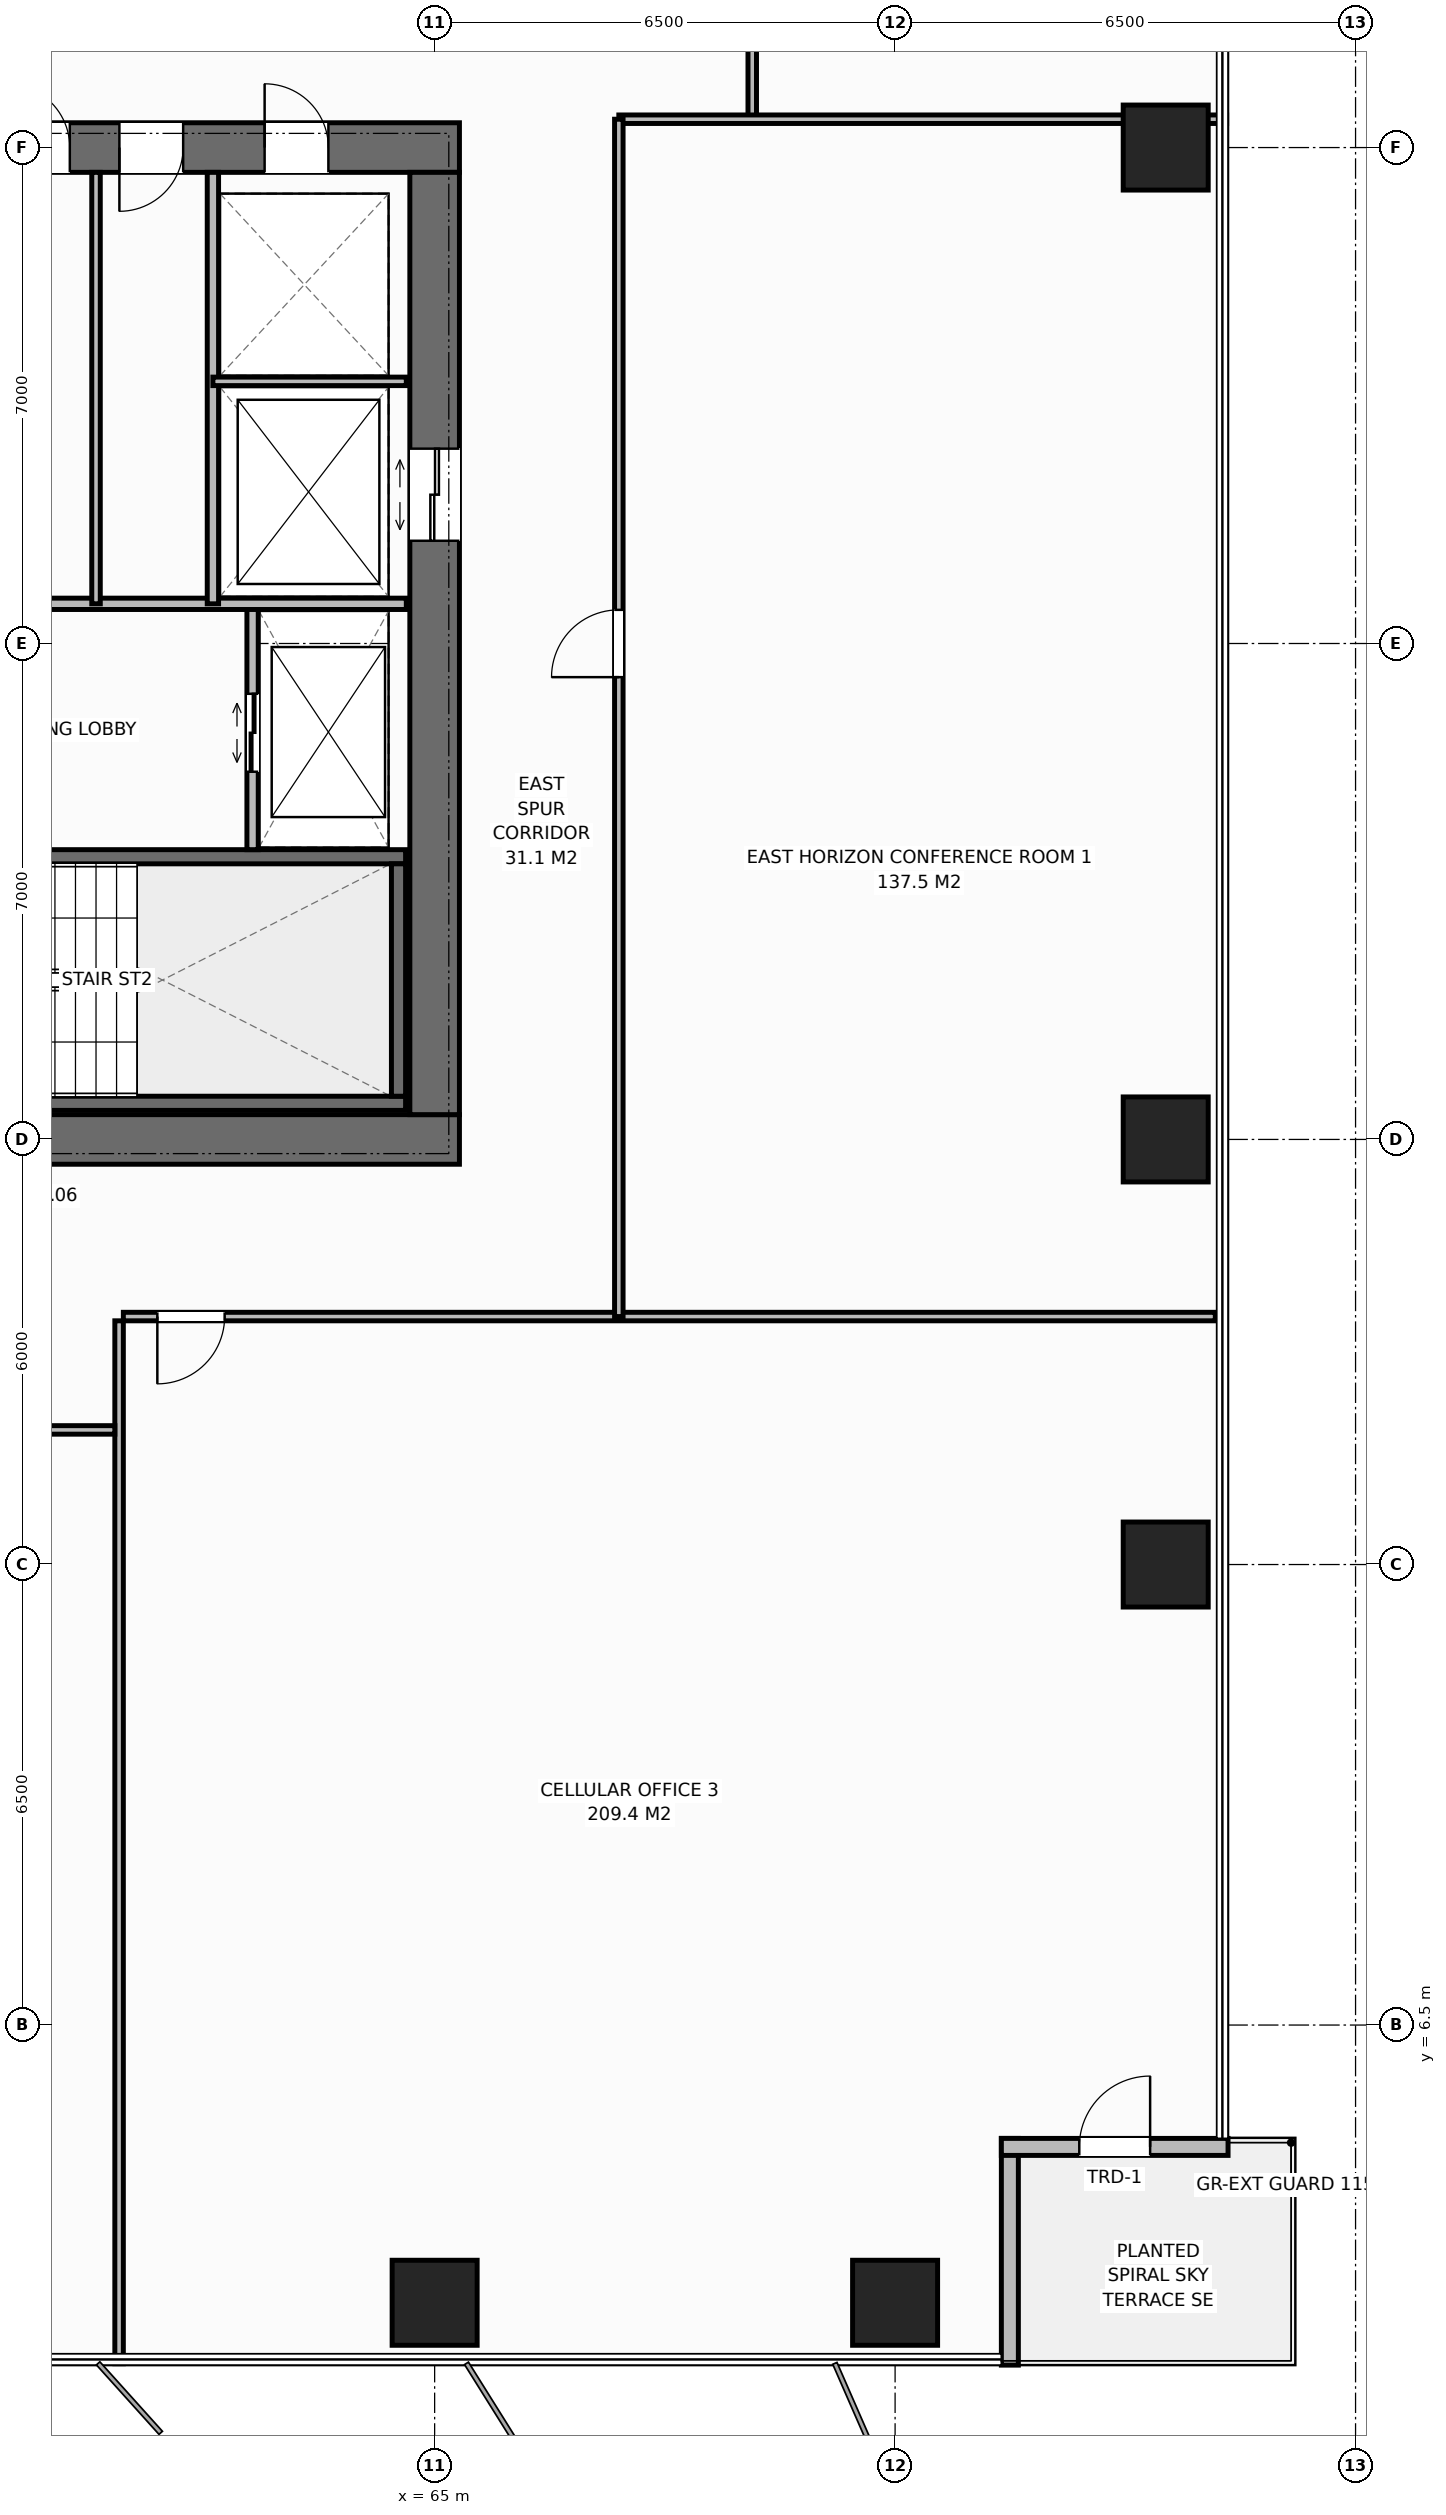
"""IFC4 building model, lengths in metres.
Left out: names, types, materials, properties, quantities, classifications, styles, units other than length and angle.
Written with IfcOpenShell. Run it as: python <this file> out.ifc"""

import sys

from ifc_helpers import new_model, si_unit, direction, frame, frame_2d, origin, origin_2d, place, context, subcontext, project, spatial, rectangle, extrude, element, fill, save


model = new_model("IFC4")
c1 = context("Model", 3, precision=1e-05, world=origin(), true_north=direction((0.0, 1.0)))
c2 = subcontext(c1, "Body", "Model", "MODEL_VIEW")
j1 = project(units=[si_unit("LENGTHUNIT", "METRE"), si_unit("PLANEANGLEUNIT", "RADIAN")], contexts=[c1])
p1 = place(None, origin())
s1 = spatial("IfcSite", under=j1, at=p1, CompositionType="ELEMENT")
p2 = place(p1, origin())
s2 = spatial("IfcBuilding", under=s1, at=p2, CompositionType="ELEMENT")
p3 = place(p2, frame((0.0, 0.0, 112.6)))
s3 = spatial("IfcBuildingStorey", under=s2, at=p3, CompositionType="ELEMENT", Elevation=112.6)
p4 = place(p3, frame((51.65, 19.0, 0.0), z_axis=(0.0, 0.0, 1.0), x_axis=(1.0, 0.0, 0.0)))
e1 = element("IfcWall", 1, at=p4, inside=s3, PredefinedType="SHEAR", context=c2, shape_type="SweptSolid", body=[
    extrude(rectangle(XDim=13.7, YDim=0.7, at=frame_2d((6.85, 0.0))), origin(), (0.0, 0.0, 1.0), 3.8),
])
p5 = place(p4, frame((3.07, 0.0, 0.0)))
e2 = element("IfcOpeningElement", 2, at=p5, cuts=e1, PredefinedType="OPENING", context=c2, shape_type="SweptSolid", body=[
    extrude(rectangle(XDim=1.4, YDim=2.2, at=frame_2d((0.7, 1.1))), frame((0.0, 0.36, 0.0), z_axis=(0.0, -1.0, 0.0), x_axis=(1.0, 0.0, 0.0)), (0.0, 0.0, 1.0), 0.72),
])
p6 = place(p3, frame((51.65, 33.0, 0.0), z_axis=(0.0, 0.0, 1.0), x_axis=(1.0, 0.0, 0.0)))
e3 = element("IfcWall", 3, at=p6, inside=s3, PredefinedType="SHEAR", context=c2, shape_type="SweptSolid", body=[
    extrude(rectangle(XDim=13.7, YDim=0.7, at=frame_2d((6.85, 0.0))), origin(), (0.0, 0.0, 1.0), 3.8),
])
p7 = place(p6, frame((3.07, 0.0, 0.0)))
e4 = element("IfcOpeningElement", 4, at=p7, cuts=e3, PredefinedType="OPENING", context=c2, shape_type="SweptSolid", body=[
    extrude(rectangle(XDim=1.4, YDim=2.2, at=frame_2d((0.7, 1.1))), frame((0.0, 0.36, 0.0), z_axis=(0.0, -1.0, 0.0), x_axis=(1.0, 0.0, 0.0)), (0.0, 0.0, 1.0), 0.72),
])
p8 = place(p6, frame((10.95, 0.0, 0.0)))
e5 = element("IfcOpeningElement", 5, at=p8, cuts=e3, PredefinedType="OPENING", context=c2, shape_type="SweptSolid", body=[
    extrude(rectangle(XDim=0.9, YDim=2.15, at=frame_2d((0.45, 1.075))), frame((0.0, 0.36, 0.0), z_axis=(0.0, -1.0, 0.0), x_axis=(1.0, 0.0, 0.0)), (0.0, 0.0, 1.0), 0.72),
])
p9 = place(p6, frame((5.7, 0.0, 0.0)))
e6 = element("IfcOpeningElement", 6, at=p9, cuts=e3, PredefinedType="OPENING", context=c2, shape_type="SweptSolid", body=[
    extrude(rectangle(XDim=0.9, YDim=2.15, at=frame_2d((0.45, 1.075))), frame((0.0, 0.36, 0.0), z_axis=(0.0, -1.0, 0.0), x_axis=(1.0, 0.0, 0.0)), (0.0, 0.0, 1.0), 0.72),
])
p10 = place(p6, frame((7.3, 0.0, 0.0)))
e7 = element("IfcOpeningElement", 7, at=p10, cuts=e3, PredefinedType="OPENING", context=c2, shape_type="SweptSolid", body=[
    extrude(rectangle(XDim=0.9, YDim=2.15, at=frame_2d((0.45, 1.075))), frame((0.0, 0.36, 0.0), z_axis=(0.0, -1.0, 0.0), x_axis=(1.0, 0.0, 0.0)), (0.0, 0.0, 1.0), 0.72),
])
p11 = place(p6, frame((8.9, 0.0, 0.0)))
e8 = element("IfcOpeningElement", 8, at=p11, cuts=e3, PredefinedType="OPENING", context=c2, shape_type="SweptSolid", body=[
    extrude(rectangle(XDim=0.9, YDim=2.15, at=frame_2d((0.45, 1.075))), frame((0.0, 0.36, 0.0), z_axis=(0.0, -1.0, 0.0), x_axis=(1.0, 0.0, 0.0)), (0.0, 0.0, 1.0), 0.72),
])
p12 = place(p3, frame((65.0, 19.35, 0.0), z_axis=(0.0, 0.0, 1.0), x_axis=(0.0, 1.0, 0.0)))
e9 = element("IfcWall", 9, at=p12, inside=s3, PredefinedType="SHEAR", context=c2, shape_type="SweptSolid", body=[
    extrude(rectangle(XDim=13.3, YDim=0.7, at=frame_2d((6.65, 0.0))), origin(), (0.0, 0.0, 1.0), 3.8),
])
p13 = place(p12, frame((8.1, 0.0, 0.0)))
e10 = element("IfcOpeningElement", 10, at=p13, cuts=e9, PredefinedType="OPENING", context=c2, shape_type="SweptSolid", body=[
    extrude(rectangle(XDim=1.3, YDim=2.2, at=frame_2d((0.65, 1.1))), frame((0.0, 0.36, 0.0), z_axis=(0.0, -1.0, 0.0), x_axis=(1.0, 0.0, 0.0)), (0.0, 0.0, 1.0), 0.72),
])
p14 = place(p3, frame((56.16, 19.51, 0.0), z_axis=(0.0, 0.0, 1.0), x_axis=(1.0, 0.0, 0.0)))
e11 = element("IfcWall", 11, at=p14, inside=s3, PredefinedType="SHEAR", context=c2, shape_type="SweptSolid", body=[
    extrude(rectangle(XDim=8.43, YDim=0.2, at=frame_2d((4.215, 0.0))), origin(), (0.0, 0.0, 1.0), 3.8),
])
p15 = place(p3, frame((56.16, 22.99, 0.0), z_axis=(0.0, 0.0, 1.0), x_axis=(1.0, 0.0, 0.0)))
e12 = element("IfcWall", 12, at=p15, inside=s3, PredefinedType="SHEAR", context=c2, shape_type="SweptSolid", body=[
    extrude(rectangle(XDim=8.43, YDim=0.2, at=frame_2d((4.215, 0.0))), origin(), (0.0, 0.0, 1.0), 3.8),
])
p16 = place(p15, frame((0.45, 0.0, 0.0)))
e13 = element("IfcOpeningElement", 13, at=p16, cuts=e12, PredefinedType="OPENING", context=c2, shape_type="SweptSolid", body=[
    extrude(rectangle(XDim=1.0, YDim=2.15, at=frame_2d((0.5, 1.075))), frame((0.0, 0.11, 0.0), z_axis=(0.0, -1.0, 0.0), x_axis=(1.0, 0.0, 0.0)), (0.0, 0.0, 1.0), 0.22),
])
p17 = place(p3, frame((64.49, 19.61, 0.0), z_axis=(0.0, 0.0, 1.0), x_axis=(0.0, 1.0, 0.0)))
e14 = element("IfcWall", 14, at=p17, inside=s3, PredefinedType="SHEAR", context=c2, shape_type="SweptSolid", body=[
    extrude(rectangle(XDim=3.28, YDim=0.2, at=frame_2d((1.64, 0.0))), origin(), (0.0, 0.0, 1.0), 3.8),
])
for number, where, z_axis, x_axis in (
    (15, (65.0, 2.58, 0.0), (0.0, 0.0, 1.0), (1.0, 0.0, 0.0)),
    (16, (71.5, 2.58, 0.0), (0.0, 0.0, 1.0), (1.0, 0.0, 0.0)),
    (17, (75.32, 13.0, 0.0), (0.0, 0.0, 1.0), (1.0, 0.0, 0.0)),
    (18, (75.32, 19.0, 0.0), (0.0, 0.0, 1.0), (1.0, 0.0, 0.0)),
    (19, (75.32, 33.0, 0.0), (0.0, 0.0, 1.0), (1.0, 0.0, 0.0)),
):
    element("IfcColumn", number, at=place(p3, frame(where, z_axis=z_axis, x_axis=x_axis)), inside=s3, PredefinedType="COLUMN", context=c2, shape_type="SweptSolid", body=[
        extrude(rectangle(XDim=1.2, YDim=1.2, at=origin_2d()), origin(), (0.0, 0.0, 1.0), 3.8),
    ])
p18 = place(p3, frame((73.12, 4.9, 0.0), z_axis=(0.0, 0.0, 1.0), x_axis=(0.0, -1.0, 0.0)))
e20 = element("IfcWall", 20, at=p18, inside=s3, PredefinedType="STANDARD", context=c2, shape_type="SweptSolid", body=[
    extrude(rectangle(XDim=3.2, YDim=0.24, at=frame_2d((1.6, 0.0))), origin(), (0.0, 0.0, 1.0), 3.565),
])
p19 = place(p3, frame((76.2, 4.78, 0.0), z_axis=(0.0, 0.0, 1.0), x_axis=(-1.0, 0.0, 0.0)))
e21 = element("IfcWall", 21, at=p19, inside=s3, PredefinedType="STANDARD", context=c2, shape_type="SweptSolid", body=[
    extrude(rectangle(XDim=3.2, YDim=0.24, at=frame_2d((1.6, 0.0))), origin(), (0.0, 0.0, 1.0), 3.565),
])
p20 = place(p19, frame((1.1, 0.0, 0.0)))
e22 = element("IfcOpeningElement", 22, at=p20, cuts=e21, PredefinedType="OPENING", context=c2, shape_type="SweptSolid", body=[
    extrude(rectangle(XDim=1.0, YDim=2.2, at=frame_2d((0.5, 1.1))), frame((0.0, 0.13, 0.0), z_axis=(0.0, -1.0, 0.0), x_axis=(1.0, 0.0, 0.0)), (0.0, 0.0, 1.0), 0.26),
])
p21 = place(p3, frame((62.43, 23.09, 0.0), z_axis=(0.0, 0.0, 1.0), x_axis=(0.0, 1.0, 0.0)))
e23 = element("IfcWall", 23, at=p21, inside=s3, PredefinedType="STANDARD", context=c2, shape_type="SweptSolid", body=[
    extrude(rectangle(XDim=3.47, YDim=0.16, at=frame_2d((1.735, 0.0))), origin(), (0.0, 0.0, 1.0), 3.565),
])
p22 = place(p21, frame((1.1, 0.0, 0.0)))
e24 = element("IfcOpeningElement", 24, at=p22, cuts=e23, PredefinedType="OPENING", context=c2, shape_type="SweptSolid", body=[
    extrude(rectangle(XDim=1.1, YDim=2.2, at=frame_2d((0.55, 1.1))), frame((0.0, 0.09, 0.0), z_axis=(0.0, -1.0, 0.0), x_axis=(1.0, 0.0, 0.0)), (0.0, 0.0, 1.0), 0.18),
])
p23 = place(p3, frame((56.26, 26.56, 0.0), z_axis=(0.0, 0.0, 1.0), x_axis=(1.0, 0.0, 0.0)))
e25 = element("IfcWall", 25, at=p23, inside=s3, PredefinedType="STANDARD", context=c2, shape_type="SweptSolid", body=[
    extrude(rectangle(XDim=8.34, YDim=0.16, at=frame_2d((4.17, 0.0))), origin(), (0.0, 0.0, 1.0), 3.565),
])
p24 = place(p3, frame((61.87, 26.56, 0.0), z_axis=(0.0, 0.0, 1.0), x_axis=(0.0, 1.0, 0.0)))
e26 = element("IfcWall", 26, at=p24, inside=s3, PredefinedType="STANDARD", context=c2, shape_type="SweptSolid", body=[
    extrude(rectangle(XDim=6.09, YDim=0.16, at=frame_2d((3.045, 0.0))), origin(), (0.0, 0.0, 1.0), 3.565),
])
p25 = place(p3, frame((61.87, 29.7, 0.0), z_axis=(0.0, 0.0, 1.0), x_axis=(1.0, 0.0, 0.0)))
e27 = element("IfcWall", 27, at=p25, inside=s3, PredefinedType="PARTITIONING", context=c2, shape_type="SweptSolid", body=[
    extrude(rectangle(XDim=2.73, YDim=0.12, at=frame_2d((1.365, 0.0))), origin(), (0.0, 0.0, 1.0), 3.565),
])
p26 = place(p3, frame((60.22, 26.56, 0.0), z_axis=(0.0, 0.0, 1.0), x_axis=(0.0, 1.0, 0.0)))
e28 = element("IfcWall", 28, at=p26, inside=s3, PredefinedType="PARTITIONING", context=c2, shape_type="SweptSolid", body=[
    extrude(rectangle(XDim=6.09, YDim=0.12, at=frame_2d((3.045, 0.0))), origin(), (0.0, 0.0, 1.0), 3.565),
])
p27 = place(p3, frame((69.483, 33.4, 0.0), z_axis=(0.0, 0.0, 1.0), x_axis=(0.0, 1.0, 0.0)))
e29 = element("IfcWall", 29, at=p27, inside=s3, PredefinedType="PARTITIONING", context=c2, shape_type="SweptSolid", body=[
    extrude(rectangle(XDim=2.1, YDim=0.12, at=frame_2d((1.05, 0.0))), origin(), (0.0, 0.0, 1.0), 3.565),
])
p28 = place(p3, frame((60.546, 1.72, 0.0), z_axis=(0.0, 0.0, 1.0), x_axis=(0.0, 1.0, 0.0)))
e30 = element("IfcWall", 30, at=p28, inside=s3, PredefinedType="PARTITIONING", context=c2, shape_type="SweptSolid", body=[
    extrude(rectangle(XDim=14.72, YDim=0.12, at=frame_2d((7.36, 0.0))), origin(), (0.0, 0.0, 1.0), 3.565),
])
p29 = place(p3, frame((44.332, 14.9, 0.0), z_axis=(0.0, 0.0, 1.0), x_axis=(1.0, 0.0, 0.0)))
e31 = element("IfcWall", 31, at=p29, inside=s3, PredefinedType="PARTITIONING", context=c2, shape_type="SweptSolid", body=[
    extrude(rectangle(XDim=16.154, YDim=0.12, at=frame_2d((8.077, 0.0))), origin(), (0.0, 0.0, 1.0), 3.565),
])
p30 = place(p29, frame((4.846, 0.0, 0.0)))
e32 = element("IfcOpeningElement", 32, at=p30, cuts=e31, PredefinedType="OPENING", context=c2, shape_type="SweptSolid", body=[
    extrude(rectangle(XDim=0.95, YDim=2.15, at=frame_2d((0.475, 1.075))), frame((0.0, 0.07, 0.0), z_axis=(0.0, -1.0, 0.0), x_axis=(1.0, 0.0, 0.0)), (0.0, 0.0, 1.0), 0.14),
])
p31 = place(p3, frame((60.606, 16.5, 0.0), z_axis=(0.0, 0.0, 1.0), x_axis=(1.0, 0.0, 0.0)))
e33 = element("IfcWall", 33, at=p31, inside=s3, PredefinedType="PARTITIONING", context=c2, shape_type="SweptSolid", body=[
    extrude(rectangle(XDim=15.414, YDim=0.12, at=frame_2d((7.707, 0.0))), origin(), (0.0, 0.0, 1.0), 3.565),
])
p32 = place(p31, frame((0.48, 0.0, 0.0)))
e34 = element("IfcOpeningElement", 34, at=p32, cuts=e33, PredefinedType="OPENING", context=c2, shape_type="SweptSolid", body=[
    extrude(rectangle(XDim=0.95, YDim=2.15, at=frame_2d((0.475, 1.075))), frame((0.0, 0.07, 0.0), z_axis=(0.0, -1.0, 0.0), x_axis=(1.0, 0.0, 0.0)), (0.0, 0.0, 1.0), 0.14),
])
p33 = place(p3, frame((67.6, 33.4, 0.0), z_axis=(0.0, 0.0, 1.0), x_axis=(1.0, 0.0, 0.0)))
e35 = element("IfcWall", 35, at=p33, inside=s3, PredefinedType="PARTITIONING", context=c2, shape_type="SweptSolid", body=[
    extrude(rectangle(XDim=8.58, YDim=0.12, at=frame_2d((4.29, 0.0))), origin(), (0.0, 0.0, 1.0), 3.565),
])
p34 = place(p3, frame((67.6, 16.5, 0.0), z_axis=(0.0, 0.0, 1.0), x_axis=(0.0, 1.0, 0.0)))
e36 = element("IfcWall", 36, at=p34, inside=s3, PredefinedType="PARTITIONING", context=c2, shape_type="SweptSolid", body=[
    extrude(rectangle(XDim=16.9, YDim=0.12, at=frame_2d((8.45, 0.0))), origin(), (0.0, 0.0, 1.0), 3.565),
])
p35 = place(p34, frame((9.025, 0.0, 0.0)))
e37 = element("IfcOpeningElement", 37, at=p35, cuts=e36, PredefinedType="OPENING", context=c2, shape_type="SweptSolid", body=[
    extrude(rectangle(XDim=0.95, YDim=2.15, at=frame_2d((0.475, 1.075))), frame((0.0, 0.07, 0.0), z_axis=(0.0, -1.0, 0.0), x_axis=(1.0, 0.0, 0.0)), (0.0, 0.0, 1.0), 0.14),
])
p36 = place(p20, origin())
e38 = element("IfcDoor", 38, at=p36, inside=s3, OperationType="SINGLE_SWING_RIGHT", PredefinedType="DOOR", context=c2, shape_type="SweptSolid", body=[
    extrude(rectangle(XDim=1.0, YDim=2.2, at=frame_2d((0.5, 1.1))), frame((0.0, 0.025, 0.0), z_axis=(0.0, -1.0, 0.0), x_axis=(1.0, 0.0, 0.0)), (0.0, 0.0, 1.0), 0.05),
])
fill(e22, e38)
p37 = place(p22, origin())
e39 = element("IfcDoor", 39, at=p37, inside=s3, OperationType="DOUBLE_DOOR_SLIDING", PredefinedType="DOOR", context=c2, shape_type="SweptSolid", body=[
    extrude(rectangle(XDim=1.1, YDim=2.2, at=frame_2d((0.55, 1.1))), frame((0.0, 0.025, 0.0), z_axis=(0.0, -1.0, 0.0), x_axis=(1.0, 0.0, 0.0)), (0.0, 0.0, 1.0), 0.05),
])
fill(e24, e39)
p38 = place(p13, origin())
e40 = element("IfcDoor", 40, at=p38, inside=s3, OperationType="DOUBLE_DOOR_SLIDING", PredefinedType="DOOR", context=c2, shape_type="SweptSolid", body=[
    extrude(rectangle(XDim=1.3, YDim=2.2, at=frame_2d((0.65, 1.1))), frame((0.0, 0.025, 0.0), z_axis=(0.0, -1.0, 0.0), x_axis=(1.0, 0.0, 0.0)), (0.0, 0.0, 1.0), 0.05),
])
fill(e10, e40)
p39 = place(p8, origin())
e41 = element("IfcDoor", 41, at=p39, inside=s3, OperationType="SINGLE_SWING_LEFT", PredefinedType="DOOR", context=c2, shape_type="SweptSolid", body=[
    extrude(rectangle(XDim=0.9, YDim=2.15, at=frame_2d((0.45, 1.075))), frame((0.0, -0.075, 0.0), z_axis=(0.0, -1.0, 0.0), x_axis=(1.0, 0.0, 0.0)), (0.0, 0.0, 1.0), 0.05),
])
fill(e5, e41)
p40 = place(p10, origin())
e42 = element("IfcDoor", 42, at=p40, inside=s3, OperationType="SINGLE_SWING_LEFT", PredefinedType="DOOR", context=c2, shape_type="SweptSolid", body=[
    extrude(rectangle(XDim=0.9, YDim=2.15, at=frame_2d((0.45, 1.075))), frame((0.0, -0.075, 0.0), z_axis=(0.0, -1.0, 0.0), x_axis=(1.0, 0.0, 0.0)), (0.0, 0.0, 1.0), 0.05),
])
fill(e7, e42)
p41 = place(p11, origin())
e43 = element("IfcDoor", 43, at=p41, inside=s3, OperationType="SINGLE_SWING_RIGHT", PredefinedType="DOOR", context=c2, shape_type="SweptSolid", body=[
    extrude(rectangle(XDim=0.9, YDim=2.15, at=frame_2d((0.45, 1.075))), frame((0.0, -0.075, 0.0), z_axis=(0.0, -1.0, 0.0), x_axis=(1.0, 0.0, 0.0)), (0.0, 0.0, 1.0), 0.05),
])
fill(e8, e43)
p42 = place(p32, origin())
e44 = element("IfcDoor", 44, at=p42, inside=s3, OperationType="SINGLE_SWING_RIGHT", PredefinedType="DOOR", context=c2, shape_type="SweptSolid", body=[
    extrude(rectangle(XDim=0.95, YDim=2.15, at=frame_2d((0.475, 1.075))), frame((0.0, 0.025, 0.0), z_axis=(0.0, -1.0, 0.0), x_axis=(1.0, 0.0, 0.0)), (0.0, 0.0, 1.0), 0.05),
])
fill(e34, e44)
p43 = place(p35, origin())
e45 = element("IfcDoor", 45, at=p43, inside=s3, OperationType="SINGLE_SWING_LEFT", PredefinedType="DOOR", context=c2, shape_type="SweptSolid", body=[
    extrude(rectangle(XDim=0.95, YDim=2.15, at=frame_2d((0.475, 1.075))), frame((0.0, 0.025, 0.0), z_axis=(0.0, -1.0, 0.0), x_axis=(1.0, 0.0, 0.0)), (0.0, 0.0, 1.0), 0.05),
])
fill(e37, e45)
save(model, sys.argv[1])
